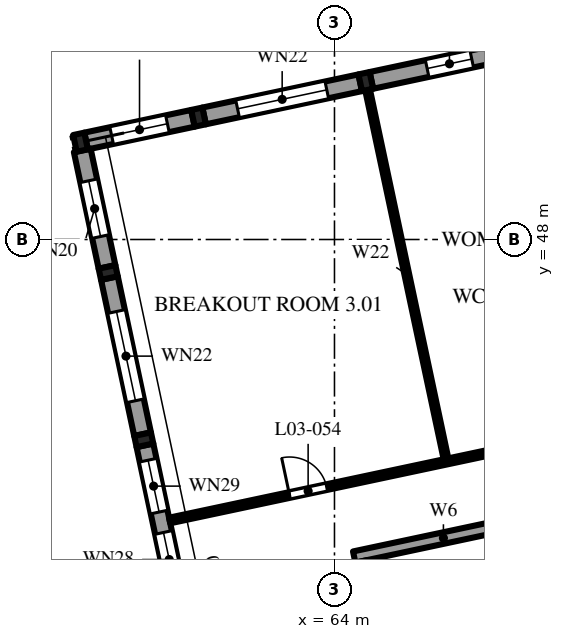
"""IFC4 building model, lengths in metres.
Left out: names, types, materials, properties, quantities, classifications, styles, units other than length and angle.
Written with IfcOpenShell. Run it as: python <this file> out.ifc"""

import sys

from ifc_helpers import new_model, si_unit, direction, frame, frame_2d, origin, origin_2d, place, context, subcontext, project, spatial, polyline, rectangle, i_section, outline, extrude, element, fill, save


model = new_model("IFC4")
c1 = context("Model", 3, precision=1e-05, world=origin(), true_north=direction((0.0, 1.0)))
c2 = subcontext(c1, "Body", "Model", "MODEL_VIEW")
j1 = project(units=[si_unit("LENGTHUNIT", "METRE"), si_unit("PLANEANGLEUNIT", "RADIAN")], contexts=[c1])
p1 = place(None, origin())
s1 = spatial("IfcSite", under=j1, at=p1, CompositionType="ELEMENT")
p2 = place(p1, origin())
s2 = spatial("IfcBuilding", under=s1, at=p2, CompositionType="ELEMENT")
p3 = place(p2, frame((0.0, 0.0, 16.8)))
s3 = spatial("IfcBuildingStorey", under=s2, at=p3, CompositionType="ELEMENT", Elevation=16.8)
for number, where, z_axis, x_axis in (
    (1, (57.317, 50.56, 0.0), (0.0, 0.0, 1.0), (0.978, 0.208, 0.0)),
    (2, (60.423, 51.22, 0.0), (0.0, 0.0, 1.0), (0.978, 0.208, 0.0)),
    (3, (64.824, 52.156, 0.0), (0.0, 0.0, 1.0), (0.978, 0.208, 0.0)),
    (4, (58.981, 42.73, 0.0), (0.0, 0.0, 1.0), (-0.208, 0.978, 0.0)),
    (5, (58.046, 47.132, 0.0), (0.0, 0.0, 1.0), (-0.208, 0.978, 0.0)),
):
    element("IfcColumn", number, at=place(p3, frame(where, z_axis=z_axis, x_axis=x_axis)), inside=s3, PredefinedType="COLUMN", context=c2, shape_type="SweptSolid", body=[
        extrude(i_section(OverallWidth=0.3, OverallDepth=0.45, WebThickness=0.014, FlangeThickness=0.026, FilletRadius=0.027, at=origin_2d()), origin(), (0.0, 0.0, 1.0), 4.8),
    ])
p4 = place(p3, frame((64.519, 39.644, 0.0), z_axis=(0.0, 0.0, 1.0), x_axis=(0.978147662755, 0.20791139903, 0.0)))
e6 = element("IfcWall", 6, at=p4, inside=s3, PredefinedType="SHEAR", context=c2, shape_type="SweptSolid", body=[
    extrude(outline(polyline([(0.0, 0.0), (13.7, 0.0), (13.7, 7.26), (0.0, 6.527), (0.0, 0.0)])), frame((0.0, 0.15, 0.0), z_axis=(0.0, -1.0, 0.0), x_axis=(1.0, 0.0, 0.0)), (0.0, 0.0, 1.0), 0.3),
])
p5 = place(p4, frame((5.1, 0.0, 0.0)))
e7 = element("IfcOpeningElement", 7, at=p5, cuts=e6, PredefinedType="OPENING", context=c2, shape_type="SweptSolid", body=[
    extrude(rectangle(XDim=1.1, YDim=2.1, at=frame_2d((0.55, 1.05))), frame((0.0, 0.16, 0.0), z_axis=(0.0, -1.0, 0.0), x_axis=(1.0, 0.0, 0.0)), (0.0, 0.0, 1.0), 0.32),
])
p6 = place(p4, frame((7.5, 0.0, 0.0)))
e8 = element("IfcOpeningElement", 8, at=p6, cuts=e6, PredefinedType="OPENING", context=c2, shape_type="SweptSolid", body=[
    extrude(rectangle(XDim=1.1, YDim=2.1, at=frame_2d((0.55, 1.05))), frame((0.0, 0.16, 0.0), z_axis=(0.0, -1.0, 0.0), x_axis=(1.0, 0.0, 0.0)), (0.0, 0.0, 1.0), 0.32),
])
p7 = place(p3, frame((57.464, 50.592, 0.0), z_axis=(0.0, 0.0, 1.0), x_axis=(0.978155181918, 0.207876020951, 0.0)))
e9 = element("IfcWall", 9, at=p7, inside=s3, PredefinedType="SOLIDWALL", context=c2, shape_type="SweptSolid", body=[
    extrude(outline(polyline([(0.0, 0.0), (2.875, 0.0), (2.875, 7.095), (0.0, 6.941), (0.0, 0.0)])), frame((0.0, 0.225, 0.0), z_axis=(0.0, -1.0, 0.0), x_axis=(1.0, 0.0, 0.0)), (0.0, 0.0, 1.0), 0.45),
])
p8 = place(p7, frame((0.688, 0.0, 0.9)))
e10 = element("IfcOpeningElement", 10, at=p8, cuts=e9, PredefinedType="OPENING", context=c2, shape_type="SweptSolid", body=[
    extrude(rectangle(XDim=1.5, YDim=2.4, at=frame_2d((0.75, 1.2))), frame((0.0, 0.235, 0.0), z_axis=(0.0, -1.0, 0.0), x_axis=(1.0, 0.0, 0.0)), (0.0, 0.0, 1.0), 0.47),
])
p9 = place(p3, frame((60.57, 51.251, 0.0), z_axis=(0.0, 0.0, 1.0), x_axis=(0.978143927149, 0.207928972925, 0.0)))
e11 = element("IfcWall", 11, at=p9, inside=s3, PredefinedType="SOLIDWALL", context=c2, shape_type="SweptSolid", body=[
    extrude(outline(polyline([(0.0, 0.0), (4.2, 0.0), (4.2, 7.336), (0.0, 7.111), (0.0, 0.0)])), frame((0.0, 0.225, 0.0), z_axis=(0.0, -1.0, 0.0), x_axis=(1.0, 0.0, 0.0)), (0.0, 0.0, 1.0), 0.45),
])
p10 = place(p9, frame((0.9, 0.0, 0.9)))
e12 = element("IfcOpeningElement", 12, at=p10, cuts=e11, PredefinedType="OPENING", context=c2, shape_type="SweptSolid", body=[
    extrude(rectangle(XDim=2.4, YDim=2.4, at=frame_2d((1.2, 1.2))), frame((0.0, 0.235, 0.0), z_axis=(0.0, -1.0, 0.0), x_axis=(1.0, 0.0, 0.0)), (0.0, 0.0, 1.0), 0.47),
])
p11 = place(p3, frame((64.971, 52.187, 0.0), z_axis=(0.0, 0.0, 1.0), x_axis=(0.978155748334, 0.207873355681, 0.0)))
e13 = element("IfcWall", 13, at=p11, inside=s3, PredefinedType="SOLIDWALL", context=c2, shape_type="SweptSolid", body=[
    extrude(outline(polyline([(0.0, 0.0), (4.2, 0.0), (4.2, 7.576), (0.0, 7.352), (0.0, 0.0)])), frame((0.0, 0.225, 0.0), z_axis=(0.0, -1.0, 0.0), x_axis=(1.0, 0.0, 0.0)), (0.0, 0.0, 1.0), 0.45),
])
p12 = place(p11, frame((1.5, 0.0, 1.5)))
e14 = element("IfcOpeningElement", 14, at=p12, cuts=e13, PredefinedType="OPENING", context=c2, shape_type="SweptSolid", body=[
    extrude(rectangle(XDim=1.2, YDim=1.2, at=frame_2d((0.6, 0.6))), frame((0.0, 0.235, 0.0), z_axis=(0.0, -1.0, 0.0), x_axis=(1.0, 0.0, 0.0)), (0.0, 0.0, 1.0), 0.47),
])
p13 = place(p3, frame((59.886, 38.475, 0.0), z_axis=(0.0, 0.0, 1.0), x_axis=(-0.207928972925, 0.978143927149, 0.0)))
e15 = element("IfcWall", 15, at=p13, inside=s3, PredefinedType="SOLIDWALL", context=c2, shape_type="SweptSolid", body=[
    extrude(outline(polyline([(0.0, 0.0), (4.2, 0.0), (4.2, 7.361), (0.0, 7.581), (0.0, 0.0)])), frame((0.0, 0.225, 0.0), z_axis=(0.0, -1.0, 0.0), x_axis=(1.0, 0.0, 0.0)), (0.0, 0.0, 1.0), 0.45),
])
p14 = place(p13, frame((0.4, 0.0, 0.9)))
e16 = element("IfcOpeningElement", 16, at=p14, cuts=e15, PredefinedType="OPENING", context=c2, shape_type="SweptSolid", body=[
    extrude(rectangle(XDim=1.455, YDim=2.4, at=frame_2d((0.728, 1.2))), frame((0.0, 0.235, 0.0), z_axis=(0.0, -1.0, 0.0), x_axis=(1.0, 0.0, 0.0)), (0.0, 0.0, 1.0), 0.47),
])
p15 = place(p13, frame((2.405, 0.0, 0.9)))
e17 = element("IfcOpeningElement", 17, at=p15, cuts=e15, PredefinedType="OPENING", context=c2, shape_type="SweptSolid", body=[
    extrude(rectangle(XDim=1.395, YDim=2.4, at=frame_2d((0.698, 1.2))), frame((0.0, 0.235, 0.0), z_axis=(0.0, -1.0, 0.0), x_axis=(1.0, 0.0, 0.0)), (0.0, 0.0, 1.0), 0.47),
])
p16 = place(p3, frame((58.95, 42.877, 0.0), z_axis=(0.0, 0.0, 1.0), x_axis=(-0.207873355681, 0.978155748334, 0.0)))
e18 = element("IfcWall", 18, at=p16, inside=s3, PredefinedType="SOLIDWALL", context=c2, shape_type="SweptSolid", body=[
    extrude(outline(polyline([(0.0, 0.0), (4.2, 0.0), (4.2, 7.125), (0.0, 7.345), (0.0, 0.0)])), frame((0.0, 0.225, 0.0), z_axis=(0.0, -1.0, 0.0), x_axis=(1.0, 0.0, 0.0)), (0.0, 0.0, 1.0), 0.45),
])
p17 = place(p16, frame((0.9, 0.0, 0.9)))
e19 = element("IfcOpeningElement", 19, at=p17, cuts=e18, PredefinedType="OPENING", context=c2, shape_type="SweptSolid", body=[
    extrude(rectangle(XDim=2.4, YDim=2.4, at=frame_2d((1.2, 1.2))), frame((0.0, 0.235, 0.0), z_axis=(0.0, -1.0, 0.0), x_axis=(1.0, 0.0, 0.0)), (0.0, 0.0, 1.0), 0.47),
])
p18 = place(p3, frame((58.015, 47.279, 0.0), z_axis=(0.0, 0.0, 1.0), x_axis=(-0.207933268122, 0.978143014087, 0.0)))
e20 = element("IfcWall", 20, at=p18, inside=s3, PredefinedType="SOLIDWALL", context=c2, shape_type="SweptSolid", body=[
    extrude(outline(polyline([(0.0, 0.0), (3.135, 0.0), (3.135, 6.945), (0.0, 7.109), (0.0, 0.0)])), frame((0.0, 0.225, 0.0), z_axis=(0.0, -1.0, 0.0), x_axis=(1.0, 0.0, 0.0)), (0.0, 0.0, 1.0), 0.45),
])
p19 = place(p18, frame((0.817, 0.0, 0.9)))
e21 = element("IfcOpeningElement", 21, at=p19, cuts=e20, PredefinedType="OPENING", context=c2, shape_type="SweptSolid", body=[
    extrude(rectangle(XDim=1.5, YDim=2.4, at=frame_2d((0.75, 1.2))), frame((0.0, 0.235, 0.0), z_axis=(0.0, -1.0, 0.0), x_axis=(1.0, 0.0, 0.0)), (0.0, 0.0, 1.0), 0.47),
])
p20 = place(p3, frame((59.663, 40.605, 0.0), z_axis=(0.0, 0.0, 1.0), x_axis=(0.978147466509, 0.207912322295, 0.0)))
e22 = element("IfcWall", 22, at=p20, inside=s3, PredefinedType="PARTITIONING", context=c2, shape_type="SweptSolid", body=[
    extrude(outline(polyline([(0.0, 0.0), (34.45, 0.0), (34.45, 7.224), (0.0, 5.381), (0.0, 0.0)])), frame((0.0, 0.075, 0.0), z_axis=(0.0, -1.0, 0.0), x_axis=(1.0, 0.0, 0.0)), (0.0, 0.0, 1.0), 0.15),
])
p21 = place(p20, frame((3.225, 0.0, 0.0)))
e23 = element("IfcOpeningElement", 23, at=p21, cuts=e22, PredefinedType="OPENING", context=c2, shape_type="SweptSolid", body=[
    extrude(rectangle(XDim=1.0, YDim=2.1, at=frame_2d((0.5, 1.05))), frame((0.0, 0.085, 0.0), z_axis=(0.0, -1.0, 0.0), x_axis=(1.0, 0.0, 0.0)), (0.0, 0.0, 1.0), 0.17),
])
p22 = place(p20, frame((9.25, 0.0, 0.0)))
e24 = element("IfcOpeningElement", 24, at=p22, cuts=e22, PredefinedType="OPENING", context=c2, shape_type="SweptSolid", body=[
    extrude(rectangle(XDim=0.9, YDim=2.1, at=frame_2d((0.45, 1.05))), frame((0.0, 0.085, 0.0), z_axis=(0.0, -1.0, 0.0), x_axis=(1.0, 0.0, 0.0)), (0.0, 0.0, 1.0), 0.17),
])
p23 = place(p20, frame((13.75, 0.0, 0.0)))
e25 = element("IfcOpeningElement", 25, at=p23, cuts=e22, PredefinedType="OPENING", context=c2, shape_type="SweptSolid", body=[
    extrude(rectangle(XDim=0.9, YDim=2.1, at=frame_2d((0.45, 1.05))), frame((0.0, 0.085, 0.0), z_axis=(0.0, -1.0, 0.0), x_axis=(1.0, 0.0, 0.0)), (0.0, 0.0, 1.0), 0.17),
])
p24 = place(p20, frame((18.15, 0.0, 0.0)))
e26 = element("IfcOpeningElement", 26, at=p24, cuts=e22, PredefinedType="OPENING", context=c2, shape_type="SweptSolid", body=[
    extrude(rectangle(XDim=1.1, YDim=2.1, at=frame_2d((0.55, 1.05))), frame((0.0, 0.085, 0.0), z_axis=(0.0, -1.0, 0.0), x_axis=(1.0, 0.0, 0.0)), (0.0, 0.0, 1.0), 0.17),
])
p25 = place(p20, frame((26.8, 0.0, 0.0)))
e27 = element("IfcOpeningElement", 27, at=p25, cuts=e22, PredefinedType="OPENING", context=c2, shape_type="SweptSolid", body=[
    extrude(rectangle(XDim=1.8, YDim=2.1, at=frame_2d((0.9, 1.05))), frame((0.0, 0.085, 0.0), z_axis=(0.0, -1.0, 0.0), x_axis=(1.0, 0.0, 0.0)), (0.0, 0.0, 1.0), 0.17),
])
p26 = place(p3, frame((64.871, 51.936, 0.0), z_axis=(0.0, 0.0, 1.0), x_axis=(0.20790935802, -0.978148096582, 0.0)))
e28 = element("IfcWall", 28, at=p26, inside=s3, PredefinedType="PARTITIONING", context=c2, shape_type="SweptSolid", body=[
    extrude(outline(polyline([(0.0, 0.0), (9.925, 0.0), (9.925, 5.551), (0.0, 5.256), (0.0, 0.0)])), frame((0.0, 0.062, 0.0), z_axis=(0.0, -1.0, 0.0), x_axis=(1.0, 0.0, 0.0)), (0.0, 0.0, 1.0), 0.125),
])
p27 = place(p8, origin())
e29 = element("IfcWindow", 29, at=p27, inside=s3, PartitioningType="SINGLE_PANEL", PredefinedType="WINDOW", context=c2, shape_type="SweptSolid", body=[
    extrude(rectangle(XDim=1.5, YDim=2.4, at=frame_2d((0.75, 1.2))), frame((0.0, 0.03, 0.0), z_axis=(0.0, -1.0, 0.0), x_axis=(1.0, 0.0, 0.0)), (0.0, 0.0, 1.0), 0.06),
])
fill(e10, e29)
p28 = place(p10, origin())
e30 = element("IfcWindow", 30, at=p28, inside=s3, PartitioningType="SINGLE_PANEL", PredefinedType="WINDOW", context=c2, shape_type="SweptSolid", body=[
    extrude(rectangle(XDim=2.4, YDim=2.4, at=frame_2d((1.2, 1.2))), frame((0.0, 0.03, 0.0), z_axis=(0.0, -1.0, 0.0), x_axis=(1.0, 0.0, 0.0)), (0.0, 0.0, 1.0), 0.06),
])
fill(e12, e30)
p29 = place(p12, origin())
e31 = element("IfcWindow", 31, at=p29, inside=s3, PartitioningType="SINGLE_PANEL", PredefinedType="WINDOW", context=c2, shape_type="SweptSolid", body=[
    extrude(rectangle(XDim=1.2, YDim=1.2, at=frame_2d((0.6, 0.6))), frame((0.0, 0.03, 0.0), z_axis=(0.0, -1.0, 0.0), x_axis=(1.0, 0.0, 0.0)), (0.0, 0.0, 1.0), 0.06),
])
fill(e14, e31)
p30 = place(p14, origin())
e32 = element("IfcWindow", 32, at=p30, inside=s3, PartitioningType="SINGLE_PANEL", PredefinedType="WINDOW", context=c2, shape_type="SweptSolid", body=[
    extrude(rectangle(XDim=1.455, YDim=2.4, at=frame_2d((0.728, 1.2))), frame((0.0, 0.03, 0.0), z_axis=(0.0, -1.0, 0.0), x_axis=(1.0, 0.0, 0.0)), (0.0, 0.0, 1.0), 0.06),
])
fill(e16, e32)
p31 = place(p15, origin())
e33 = element("IfcWindow", 33, at=p31, inside=s3, PartitioningType="SINGLE_PANEL", PredefinedType="WINDOW", context=c2, shape_type="SweptSolid", body=[
    extrude(rectangle(XDim=1.395, YDim=2.4, at=frame_2d((0.698, 1.2))), frame((0.0, 0.03, 0.0), z_axis=(0.0, -1.0, 0.0), x_axis=(1.0, 0.0, 0.0)), (0.0, 0.0, 1.0), 0.06),
])
fill(e17, e33)
p32 = place(p17, origin())
e34 = element("IfcWindow", 34, at=p32, inside=s3, PartitioningType="SINGLE_PANEL", PredefinedType="WINDOW", context=c2, shape_type="SweptSolid", body=[
    extrude(rectangle(XDim=2.4, YDim=2.4, at=frame_2d((1.2, 1.2))), frame((0.0, 0.03, 0.0), z_axis=(0.0, -1.0, 0.0), x_axis=(1.0, 0.0, 0.0)), (0.0, 0.0, 1.0), 0.06),
])
fill(e19, e34)
p33 = place(p19, origin())
e35 = element("IfcWindow", 35, at=p33, inside=s3, PartitioningType="SINGLE_PANEL", PredefinedType="WINDOW", context=c2, shape_type="SweptSolid", body=[
    extrude(rectangle(XDim=1.5, YDim=2.4, at=frame_2d((0.75, 1.2))), frame((0.0, 0.03, 0.0), z_axis=(0.0, -1.0, 0.0), x_axis=(1.0, 0.0, 0.0)), (0.0, 0.0, 1.0), 0.06),
])
fill(e21, e35)
p34 = place(p21, origin())
e36 = element("IfcDoor", 36, at=p34, inside=s3, OperationType="SINGLE_SWING_RIGHT", PredefinedType="DOOR", context=c2, shape_type="SweptSolid", body=[
    extrude(rectangle(XDim=1.0, YDim=2.1, at=frame_2d((0.5, 1.05))), frame((0.0, 0.025, 0.0), z_axis=(0.0, -1.0, 0.0), x_axis=(1.0, 0.0, 0.0)), (0.0, 0.0, 1.0), 0.05),
])
fill(e23, e36)
save(model, sys.argv[1])
